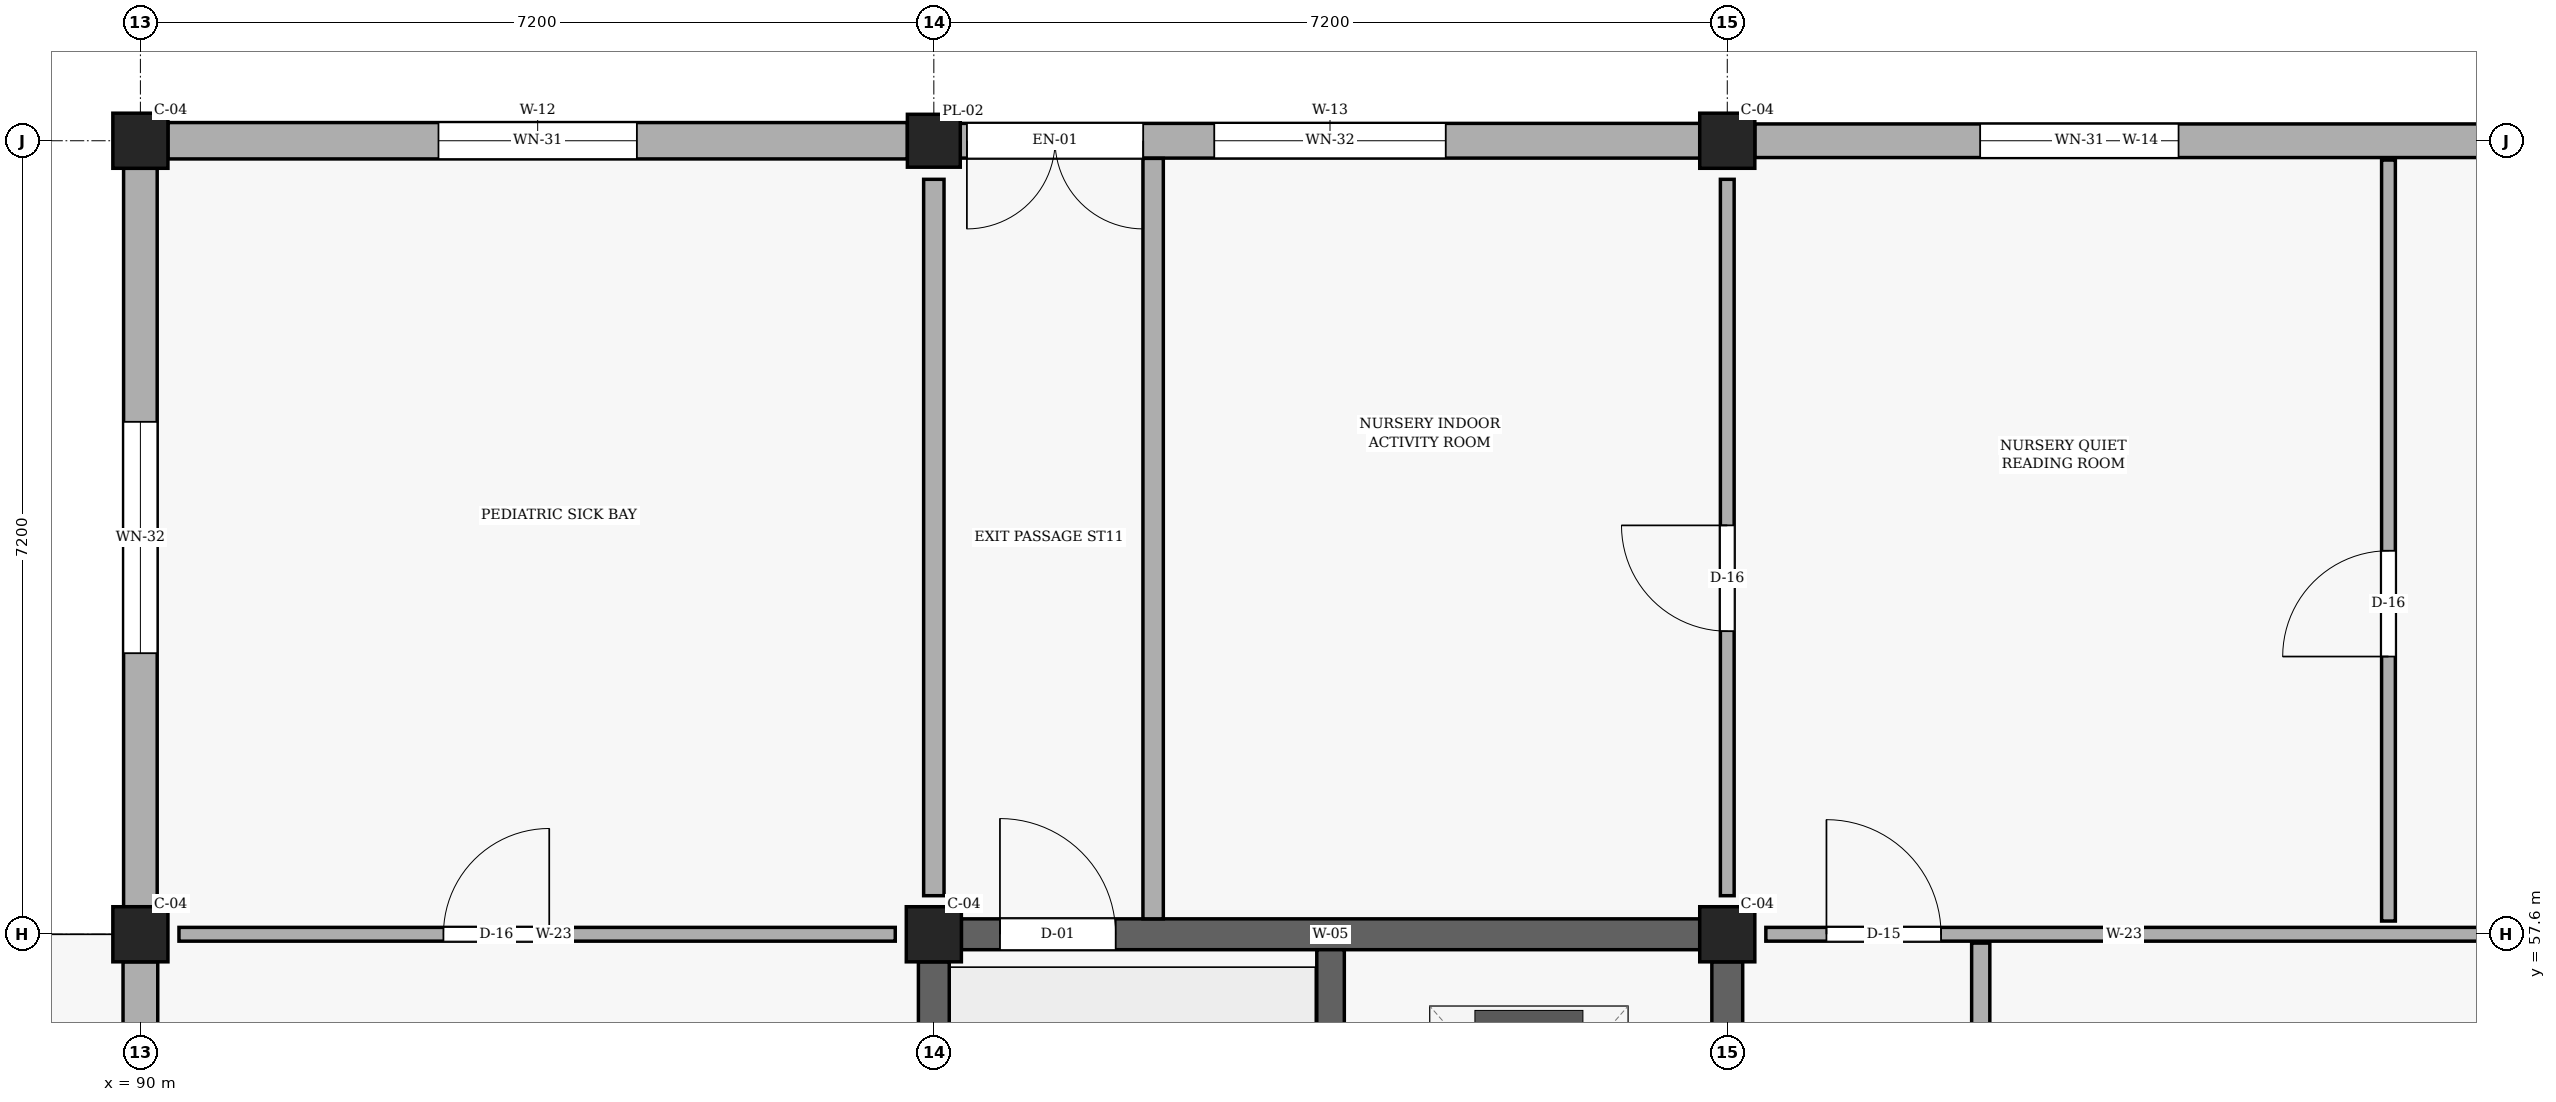
"""IFC4 building model, lengths in metres.
Left out: names, types, materials, properties, quantities, classifications, styles, units other than length and angle.
Written with IfcOpenShell. Run it as: python <this file> out.ifc"""

import sys

from ifc_helpers import new_model, si_unit, direction, frame, frame_2d, origin, origin_2d, place, context, subcontext, project, spatial, rectangle, extrude, element, fill, save


model = new_model("IFC4")
c1 = context("Model", 3, precision=1e-05, world=origin(), true_north=direction((0.0, 1.0)))
c2 = subcontext(c1, "Body", "Model", "MODEL_VIEW")
j1 = project(units=[si_unit("LENGTHUNIT", "METRE"), si_unit("PLANEANGLEUNIT", "RADIAN")], contexts=[c1])
p1 = place(None, origin())
s1 = spatial("IfcSite", under=j1, at=p1, CompositionType="ELEMENT")
p2 = place(p1, origin())
s2 = spatial("IfcBuilding", under=s1, at=p2, CompositionType="ELEMENT")
p3 = place(p2, origin())
s3 = spatial("IfcBuildingStorey", under=s2, at=p3, CompositionType="ELEMENT", Elevation=0.0)
for number, where, z_axis, x_axis in (
    (1, (90.0, 57.6, 0.0), (0.0, 0.0, 1.0), (1.0, 0.0, 0.0)),
    (2, (90.0, 64.8, 0.0), (0.0, 0.0, 1.0), (1.0, 0.0, 0.0)),
    (3, (97.2, 57.6, 0.0), (0.0, 0.0, 1.0), (1.0, 0.0, 0.0)),
):
    element("IfcColumn", number, at=place(p3, frame(where, z_axis=z_axis, x_axis=x_axis)), inside=s3, PredefinedType="COLUMN", context=c2, shape_type="SweptSolid", body=[
        extrude(rectangle(XDim=0.5, YDim=0.5, at=origin_2d()), origin(), (0.0, 0.0, 1.0), 4.5),
    ])
p4 = place(p3, frame((97.2, 64.8, 0.0), z_axis=(0.0, 0.0, 1.0), x_axis=(1.0, 0.0, 0.0)))
e4 = element("IfcColumn", 4, at=p4, inside=s3, PredefinedType="PILASTER", context=c2, shape_type="SweptSolid", body=[
    extrude(rectangle(XDim=0.48, YDim=0.48, at=origin_2d()), origin(), (0.0, 0.0, 1.0), 4.5),
])
for number, where, z_axis, x_axis in (
    (5, (104.4, 57.6, 0.0), (0.0, 0.0, 1.0), (1.0, 0.0, 0.0)),
    (6, (104.4, 64.8, 0.0), (0.0, 0.0, 1.0), (1.0, 0.0, 0.0)),
):
    element("IfcColumn", number, at=place(p3, frame(where, z_axis=z_axis, x_axis=x_axis)), inside=s3, PredefinedType="COLUMN", context=c2, shape_type="SweptSolid", body=[
        extrude(rectangle(XDim=0.5, YDim=0.5, at=origin_2d()), origin(), (0.0, 0.0, 1.0), 4.5),
    ])
p5 = place(p3, frame((111.35, 64.8, 0.0), z_axis=(0.0, 0.0, 1.0), x_axis=(-1.0, 0.0, 0.0)))
e7 = element("IfcWall", 7, at=p5, inside=s3, PredefinedType="SOLIDWALL", context=c2, shape_type="SweptSolid", body=[
    extrude(rectangle(XDim=6.7, YDim=0.305, at=frame_2d((3.35, 0.0))), origin(), (0.0, 0.0, 1.0), 3.83),
])
p6 = place(p5, frame((2.855, 0.0, 0.85)))
e8 = element("IfcOpeningElement", 8, at=p6, cuts=e7, PredefinedType="OPENING", context=c2, shape_type="SweptSolid", body=[
    extrude(rectangle(XDim=1.8, YDim=2.1, at=frame_2d((0.9, 1.05))), frame((0.0, 0.163, 0.0), z_axis=(0.0, -1.0, 0.0), x_axis=(1.0, 0.0, 0.0)), (0.0, 0.0, 1.0), 0.325),
])
p7 = place(p3, frame((104.15, 64.8, 0.0), z_axis=(0.0, 0.0, 1.0), x_axis=(-1.0, 0.0, 0.0)))
e9 = element("IfcWall", 9, at=p7, inside=s3, PredefinedType="SOLIDWALL", context=c2, shape_type="SweptSolid", body=[
    extrude(rectangle(XDim=6.71, YDim=0.315, at=frame_2d((3.355, 0.0))), origin(), (0.0, 0.0, 1.0), 3.83),
])
p8 = place(p7, frame((2.305, 0.0, 0.85)))
e10 = element("IfcOpeningElement", 10, at=p8, cuts=e9, PredefinedType="OPENING", context=c2, shape_type="SweptSolid", body=[
    extrude(rectangle(XDim=2.1, YDim=2.1, at=frame_2d((1.05, 1.05))), frame((0.0, 0.167, 0.0), z_axis=(0.0, -1.0, 0.0), x_axis=(1.0, 0.0, 0.0)), (0.0, 0.0, 1.0), 0.335),
])
p9 = place(p7, frame((5.05, 0.0, 0.0)))
e11 = element("IfcOpeningElement", 11, at=p9, cuts=e9, PredefinedType="OPENING", context=c2, shape_type="SweptSolid", body=[
    extrude(rectangle(XDim=1.6, YDim=2.25, at=frame_2d((0.8, 1.125))), frame((0.0, 0.167, 0.0), z_axis=(0.0, -1.0, 0.0), x_axis=(1.0, 0.0, 0.0)), (0.0, 0.0, 1.0), 0.335),
])
p10 = place(p3, frame((96.96, 64.8, 0.0), z_axis=(0.0, 0.0, 1.0), x_axis=(-1.0, 0.0, 0.0)))
e12 = element("IfcWall", 12, at=p10, inside=s3, PredefinedType="SOLIDWALL", context=c2, shape_type="SweptSolid", body=[
    extrude(rectangle(XDim=6.71, YDim=0.33, at=frame_2d((3.355, 0.0))), origin(), (0.0, 0.0, 1.0), 3.83),
])
p11 = place(p10, frame((2.455, 0.0, 0.85)))
e13 = element("IfcOpeningElement", 13, at=p11, cuts=e12, PredefinedType="OPENING", context=c2, shape_type="SweptSolid", body=[
    extrude(rectangle(XDim=1.8, YDim=2.1, at=frame_2d((0.9, 1.05))), frame((0.0, 0.175, 0.0), z_axis=(0.0, -1.0, 0.0), x_axis=(1.0, 0.0, 0.0)), (0.0, 0.0, 1.0), 0.35),
])
p12 = place(p3, frame((90.0, 64.55, 0.0), z_axis=(0.0, 0.0, 1.0), x_axis=(0.0, -1.0, 0.0)))
e14 = element("IfcWall", 14, at=p12, inside=s3, PredefinedType="SOLIDWALL", context=c2, shape_type="SweptSolid", body=[
    extrude(rectangle(XDim=6.7, YDim=0.305, at=frame_2d((3.35, 0.0))), origin(), (0.0, 0.0, 1.0), 3.83),
])
p13 = place(p12, frame((2.3, 0.0, 0.85)))
e15 = element("IfcOpeningElement", 15, at=p13, cuts=e14, PredefinedType="OPENING", context=c2, shape_type="SweptSolid", body=[
    extrude(rectangle(XDim=2.1, YDim=2.1, at=frame_2d((1.05, 1.05))), frame((0.0, 0.163, 0.0), z_axis=(0.0, -1.0, 0.0), x_axis=(1.0, 0.0, 0.0)), (0.0, 0.0, 1.0), 0.325),
])
p14 = place(p3, frame((90.0, 57.35, 0.0), z_axis=(0.0, 0.0, 1.0), x_axis=(0.0, -1.0, 0.0)))
e16 = element("IfcWall", 16, at=p14, inside=s3, PredefinedType="SOLIDWALL", context=c2, shape_type="SweptSolid", body=[
    extrude(rectangle(XDim=6.71, YDim=0.315, at=frame_2d((3.355, 0.0))), origin(), (0.0, 0.0, 1.0), 3.83),
])
p15 = place(p14, frame((2.605, 0.0, 0.0)))
e17 = element("IfcOpeningElement", 17, at=p15, cuts=e16, PredefinedType="OPENING", context=c2, shape_type="SweptSolid", body=[
    extrude(rectangle(XDim=1.5, YDim=2.2, at=frame_2d((0.75, 1.1))), frame((0.0, 0.167, 0.0), z_axis=(0.0, -1.0, 0.0), x_axis=(1.0, 0.0, 0.0)), (0.0, 0.0, 1.0), 0.335),
])
p16 = place(p3, frame((97.2, 50.65, 0.0), z_axis=(0.0, 0.0, 1.0), x_axis=(0.0, 1.0, 0.0)))
e18 = element("IfcWall", 18, at=p16, inside=s3, PredefinedType="SHEAR", context=c2, shape_type="SweptSolid", body=[
    extrude(rectangle(XDim=6.7, YDim=0.28, at=frame_2d((3.35, 0.0))), origin(), (0.0, 0.0, 1.0), 4.26),
])
p17 = place(p3, frame((97.45, 57.6, 0.0), z_axis=(0.0, 0.0, 1.0), x_axis=(1.0, 0.0, 0.0)))
e19 = element("IfcWall", 19, at=p17, inside=s3, PredefinedType="SHEAR", context=c2, shape_type="SweptSolid", body=[
    extrude(rectangle(XDim=6.7, YDim=0.28, at=frame_2d((3.35, 0.0))), origin(), (0.0, 0.0, 1.0), 4.26),
])
p18 = place(p17, frame((0.35, 0.0, 0.0)))
e20 = element("IfcOpeningElement", 20, at=p18, cuts=e19, PredefinedType="OPENING", context=c2, shape_type="SweptSolid", body=[
    extrude(rectangle(XDim=1.05, YDim=2.15, at=frame_2d((0.525, 1.075))), frame((0.0, 0.15, 0.0), z_axis=(0.0, -1.0, 0.0), x_axis=(1.0, 0.0, 0.0)), (0.0, 0.0, 1.0), 0.3),
])
p19 = place(p3, frame((104.4, 50.65, 0.0), z_axis=(0.0, 0.0, 1.0), x_axis=(0.0, 1.0, 0.0)))
e21 = element("IfcWall", 21, at=p19, inside=s3, PredefinedType="SHEAR", context=c2, shape_type="SweptSolid", body=[
    extrude(rectangle(XDim=6.7, YDim=0.28, at=frame_2d((3.35, 0.0))), origin(), (0.0, 0.0, 1.0), 4.26),
])
p20 = place(p3, frame((100.8, 50.54, 0.0), z_axis=(0.0, 0.0, 1.0), x_axis=(0.0, 1.0, 0.0)))
e22 = element("IfcWall", 22, at=p20, inside=s3, PredefinedType="SHEAR", context=c2, shape_type="SweptSolid", body=[
    extrude(rectangle(XDim=6.92, YDim=0.25, at=frame_2d((3.46, 0.0))), origin(), (0.0, 0.0, 1.0), 4.26),
])
p21 = place(p20, frame((0.46, 0.0, 0.0)))
e23 = element("IfcOpeningElement", 23, at=p21, cuts=e22, PredefinedType="OPENING", context=c2, shape_type="SweptSolid", body=[
    extrude(rectangle(XDim=1.05, YDim=2.15, at=frame_2d((0.525, 1.075))), frame((0.0, 0.135, 0.0), z_axis=(0.0, -1.0, 0.0), x_axis=(1.0, 0.0, 0.0)), (0.0, 0.0, 1.0), 0.27),
])
p22 = place(p3, frame((106.7, 50.48, 0.0), z_axis=(0.0, 0.0, 1.0), x_axis=(0.0, 1.0, 0.0)))
e24 = element("IfcWall", 24, at=p22, inside=s3, PredefinedType="PARTITIONING", context=c2, shape_type="SweptSolid", body=[
    extrude(rectangle(XDim=7.04, YDim=0.165, at=frame_2d((3.52, 0.0))), origin(), (0.0, 0.0, 1.0), 3.41),
])
p23 = place(p3, frame((90.35, 57.6, 0.0), z_axis=(0.0, 0.0, 1.0), x_axis=(1.0, 0.0, 0.0)))
e25 = element("IfcWall", 25, at=p23, inside=s3, PredefinedType="PARTITIONING", context=c2, shape_type="SweptSolid", body=[
    extrude(rectangle(XDim=6.5, YDim=0.125, at=frame_2d((3.25, 0.0))), origin(), (0.0, 0.0, 1.0), 3.41),
])
p24 = place(p23, frame((2.4, 0.0, 0.0)))
e26 = element("IfcOpeningElement", 26, at=p24, cuts=e25, PredefinedType="OPENING", context=c2, shape_type="SweptSolid", body=[
    extrude(rectangle(XDim=0.96, YDim=2.1, at=frame_2d((0.48, 1.05))), frame((0.0, 0.073, 0.0), z_axis=(0.0, -1.0, 0.0), x_axis=(1.0, 0.0, 0.0)), (0.0, 0.0, 1.0), 0.145),
])
p25 = place(p3, frame((104.75, 57.6, 0.0), z_axis=(0.0, 0.0, 1.0), x_axis=(1.0, 0.0, 0.0)))
e27 = element("IfcWall", 27, at=p25, inside=s3, PredefinedType="PARTITIONING", context=c2, shape_type="SweptSolid", body=[
    extrude(rectangle(XDim=6.5, YDim=0.125, at=frame_2d((3.25, 0.0))), origin(), (0.0, 0.0, 1.0), 3.41),
])
p26 = place(p25, frame((0.55, 0.0, 0.0)))
e28 = element("IfcOpeningElement", 28, at=p26, cuts=e27, PredefinedType="OPENING", context=c2, shape_type="SweptSolid", body=[
    extrude(rectangle(XDim=1.04, YDim=2.12, at=frame_2d((0.52, 1.06))), frame((0.0, 0.073, 0.0), z_axis=(0.0, -1.0, 0.0), x_axis=(1.0, 0.0, 0.0)), (0.0, 0.0, 1.0), 0.145),
])
p27 = place(p3, frame((97.2, 57.95, 0.0), z_axis=(0.0, 0.0, 1.0), x_axis=(0.0, 1.0, 0.0)))
e29 = element("IfcWall", 29, at=p27, inside=s3, PredefinedType="PARTITIONING", context=c2, shape_type="SweptSolid", body=[
    extrude(rectangle(XDim=6.5, YDim=0.185, at=frame_2d((3.25, 0.0))), origin(), (0.0, 0.0, 1.0), 3.41),
])
p28 = place(p3, frame((104.4, 57.95, 0.0), z_axis=(0.0, 0.0, 1.0), x_axis=(0.0, 1.0, 0.0)))
e30 = element("IfcWall", 30, at=p28, inside=s3, PredefinedType="PARTITIONING", context=c2, shape_type="SweptSolid", body=[
    extrude(rectangle(XDim=6.5, YDim=0.125, at=frame_2d((3.25, 0.0))), origin(), (0.0, 0.0, 1.0), 3.41),
])
p29 = place(p28, frame((2.4, 0.0, 0.0)))
e31 = element("IfcOpeningElement", 31, at=p29, cuts=e30, PredefinedType="OPENING", context=c2, shape_type="SweptSolid", body=[
    extrude(rectangle(XDim=0.96, YDim=2.1, at=frame_2d((0.48, 1.05))), frame((0.0, 0.073, 0.0), z_axis=(0.0, -1.0, 0.0), x_axis=(1.0, 0.0, 0.0)), (0.0, 0.0, 1.0), 0.145),
])
p30 = place(p3, frame((110.4, 57.72, 0.0), z_axis=(0.0, 0.0, 1.0), x_axis=(0.0, 1.0, 0.0)))
e32 = element("IfcWall", 32, at=p30, inside=s3, PredefinedType="PARTITIONING", context=c2, shape_type="SweptSolid", body=[
    extrude(rectangle(XDim=6.905, YDim=0.125, at=frame_2d((3.453, 0.0))), origin(), (0.0, 0.0, 1.0), 3.41),
])
p31 = place(p30, frame((2.4, 0.0, 0.0)))
e33 = element("IfcOpeningElement", 33, at=p31, cuts=e32, PredefinedType="OPENING", context=c2, shape_type="SweptSolid", body=[
    extrude(rectangle(XDim=0.96, YDim=2.1, at=frame_2d((0.48, 1.05))), frame((0.0, 0.073, 0.0), z_axis=(0.0, -1.0, 0.0), x_axis=(1.0, 0.0, 0.0)), (0.0, 0.0, 1.0), 0.145),
])
p32 = place(p3, frame((99.19, 57.74, 0.0), z_axis=(0.0, 0.0, 1.0), x_axis=(0.0, 1.0, 0.0)))
e34 = element("IfcWall", 34, at=p32, inside=s3, PredefinedType="PARTITIONING", context=c2, shape_type="SweptSolid", body=[
    extrude(rectangle(XDim=6.9, YDim=0.185, at=frame_2d((3.45, 0.0))), origin(), (0.0, 0.0, 1.0), 3.41),
])
p33 = place(p6, origin())
e35 = element("IfcWindow", 35, at=p33, inside=s3, PartitioningType="SINGLE_PANEL", PredefinedType="WINDOW", context=c2, shape_type="SweptSolid", body=[
    extrude(rectangle(XDim=1.8, YDim=2.1, at=frame_2d((0.9, 1.05))), frame((0.0, 0.03, 0.0), z_axis=(0.0, -1.0, 0.0), x_axis=(1.0, 0.0, 0.0)), (0.0, 0.0, 1.0), 0.06),
])
fill(e8, e35)
p34 = place(p8, origin())
e36 = element("IfcWindow", 36, at=p34, inside=s3, PartitioningType="SINGLE_PANEL", PredefinedType="WINDOW", context=c2, shape_type="SweptSolid", body=[
    extrude(rectangle(XDim=2.1, YDim=2.1, at=frame_2d((1.05, 1.05))), frame((0.0, 0.03, 0.0), z_axis=(0.0, -1.0, 0.0), x_axis=(1.0, 0.0, 0.0)), (0.0, 0.0, 1.0), 0.06),
])
fill(e10, e36)
p35 = place(p11, origin())
e37 = element("IfcWindow", 37, at=p35, inside=s3, PartitioningType="SINGLE_PANEL", PredefinedType="WINDOW", context=c2, shape_type="SweptSolid", body=[
    extrude(rectangle(XDim=1.8, YDim=2.1, at=frame_2d((0.9, 1.05))), frame((0.0, 0.03, 0.0), z_axis=(0.0, -1.0, 0.0), x_axis=(1.0, 0.0, 0.0)), (0.0, 0.0, 1.0), 0.06),
])
fill(e13, e37)
p36 = place(p13, origin())
e38 = element("IfcWindow", 38, at=p36, inside=s3, PartitioningType="SINGLE_PANEL", PredefinedType="WINDOW", context=c2, shape_type="SweptSolid", body=[
    extrude(rectangle(XDim=2.1, YDim=2.1, at=frame_2d((1.05, 1.05))), frame((0.0, 0.03, 0.0), z_axis=(0.0, -1.0, 0.0), x_axis=(1.0, 0.0, 0.0)), (0.0, 0.0, 1.0), 0.06),
])
fill(e15, e38)
p37 = place(p24, origin())
e39 = element("IfcDoor", 39, at=p37, inside=s3, OperationType="SINGLE_SWING_RIGHT", PredefinedType="DOOR", context=c2, shape_type="SweptSolid", body=[
    extrude(rectangle(XDim=0.96, YDim=2.1, at=frame_2d((0.48, 1.05))), frame((0.0, 0.025, 0.0), z_axis=(0.0, -1.0, 0.0), x_axis=(1.0, 0.0, 0.0)), (0.0, 0.0, 1.0), 0.05),
])
fill(e26, e39)
p38 = place(p26, origin())
e40 = element("IfcDoor", 40, at=p38, inside=s3, OperationType="SINGLE_SWING_LEFT", PredefinedType="DOOR", context=c2, shape_type="SweptSolid", body=[
    extrude(rectangle(XDim=1.04, YDim=2.12, at=frame_2d((0.52, 1.06))), frame((0.0, 0.025, 0.0), z_axis=(0.0, -1.0, 0.0), x_axis=(1.0, 0.0, 0.0)), (0.0, 0.0, 1.0), 0.05),
])
fill(e28, e40)
p39 = place(p29, origin())
e41 = element("IfcDoor", 41, at=p39, inside=s3, OperationType="SINGLE_SWING_RIGHT", PredefinedType="DOOR", context=c2, shape_type="SweptSolid", body=[
    extrude(rectangle(XDim=0.96, YDim=2.1, at=frame_2d((0.48, 1.05))), frame((0.0, 0.025, 0.0), z_axis=(0.0, -1.0, 0.0), x_axis=(1.0, 0.0, 0.0)), (0.0, 0.0, 1.0), 0.05),
])
fill(e31, e41)
p40 = place(p31, origin())
e42 = element("IfcDoor", 42, at=p40, inside=s3, OperationType="SINGLE_SWING_LEFT", PredefinedType="DOOR", context=c2, shape_type="SweptSolid", body=[
    extrude(rectangle(XDim=0.96, YDim=2.1, at=frame_2d((0.48, 1.05))), frame((0.0, 0.025, 0.0), z_axis=(0.0, -1.0, 0.0), x_axis=(1.0, 0.0, 0.0)), (0.0, 0.0, 1.0), 0.05),
])
fill(e33, e42)
p41 = place(p18, origin())
e43 = element("IfcDoor", 43, at=p41, inside=s3, OperationType="SINGLE_SWING_LEFT", PredefinedType="DOOR", context=c2, shape_type="SweptSolid", body=[
    extrude(rectangle(XDim=1.05, YDim=2.15, at=frame_2d((0.525, 1.075))), frame((0.0, 0.025, 0.0), z_axis=(0.0, -1.0, 0.0), x_axis=(1.0, 0.0, 0.0)), (0.0, 0.0, 1.0), 0.05),
])
fill(e20, e43)
p42 = place(p9, frame((1.6, 0.0, 0.0), z_axis=(0.0, 0.0, 1.0), x_axis=(-1.0, 0.0, 0.0)))
e44 = element("IfcDoor", 44, at=p42, inside=s3, OperationType="DOUBLE_DOOR_SINGLE_SWING", PredefinedType="DOOR", context=c2, shape_type="SweptSolid", body=[
    extrude(rectangle(XDim=1.6, YDim=2.25, at=frame_2d((0.8, 1.125))), frame((0.0, 0.025, 0.0), z_axis=(0.0, -1.0, 0.0), x_axis=(1.0, 0.0, 0.0)), (0.0, 0.0, 1.0), 0.05),
])
fill(e11, e44)
save(model, sys.argv[1])
